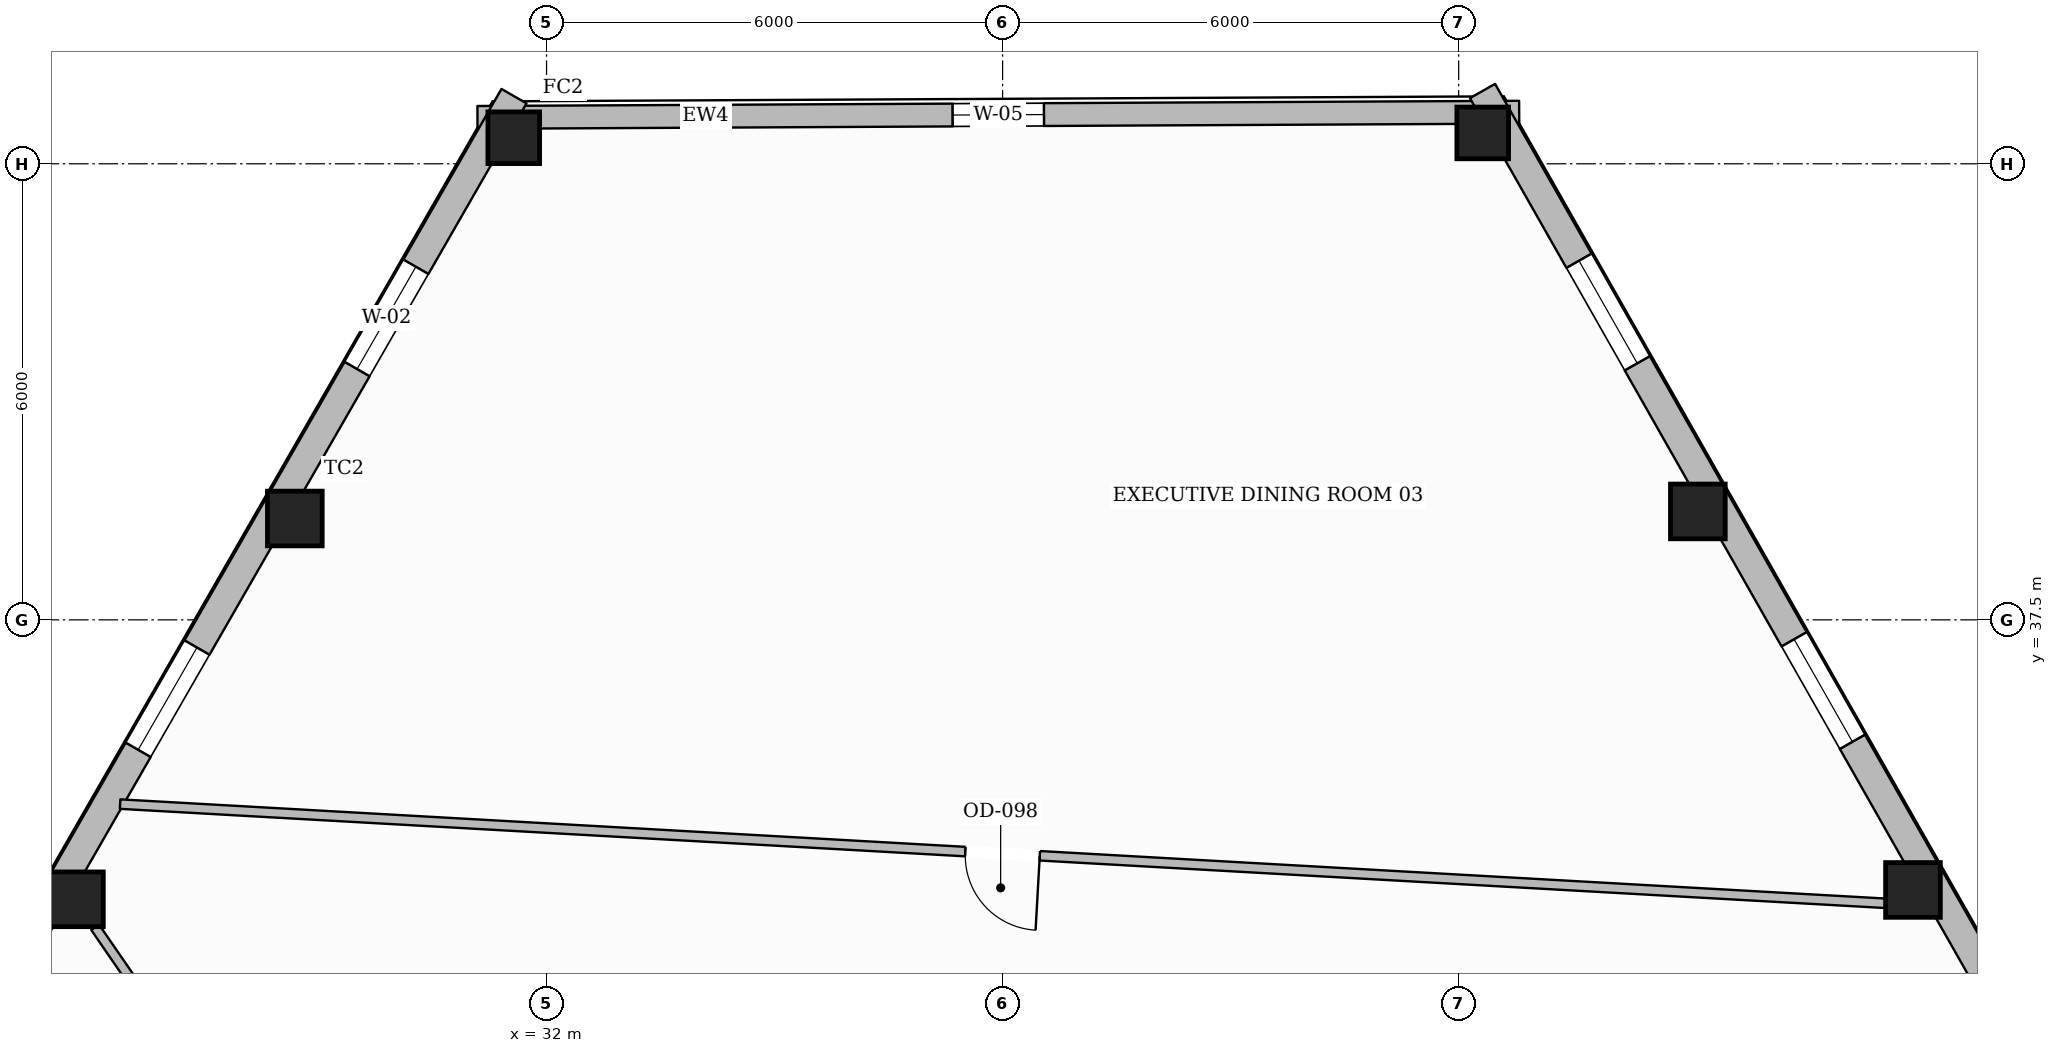
"""IFC4 building model, lengths in metres.
Left out: names, types, materials, properties, quantities, classifications, styles, units other than length and angle.
Written with IfcOpenShell. Run it as: python <this file> out.ifc"""

import sys

from ifc_helpers import new_model, si_unit, direction, frame, frame_2d, origin, origin_2d, place, context, subcontext, project, spatial, rectangle, hollow_rectangle, extrude, element, fill, save


model = new_model("IFC4")
c1 = context("Model", 3, precision=1e-05, world=origin(), true_north=direction((0.0, 1.0)))
c2 = subcontext(c1, "Body", "Model", "MODEL_VIEW")
j1 = project(units=[si_unit("LENGTHUNIT", "METRE"), si_unit("PLANEANGLEUNIT", "RADIAN")], contexts=[c1])
p1 = place(None, origin())
s1 = spatial("IfcSite", under=j1, at=p1, CompositionType="ELEMENT")
p2 = place(p1, origin())
s2 = spatial("IfcBuilding", under=s1, at=p2, CompositionType="ELEMENT")
p3 = place(p2, frame((0.0, 0.0, 85.5)))
s3 = spatial("IfcBuildingStorey", under=s2, at=p3, CompositionType="ELEMENT", Elevation=85.5)
p4 = place(p3, frame((31.569, 43.843, 0.0), z_axis=(0.0, 0.0, 1.0), x_axis=(1.0, 0.0, 0.0)))
e1 = element("IfcColumn", 1, at=p4, inside=s3, PredefinedType="COLUMN", context=c2, shape_type="SweptSolid", body=[
    extrude(hollow_rectangle(XDim=0.68, YDim=0.68, WallThickness=0.03, at=origin_2d()), origin(), (0.0, 0.0, 1.0), 3.6),
])
for number, where, z_axis, x_axis in (
    (2, (28.688, 38.833, 0.0), (0.0, 0.0, 1.0), (1.0, 0.0, 0.0)),
    (3, (25.808, 33.823, 0.0), (0.0, 0.0, 1.0), (1.0, 0.0, 0.0)),
    (4, (49.977, 33.946, 0.0), (0.0, 0.0, 1.0), (1.0, 0.0, 0.0)),
    (5, (47.147, 38.926, 0.0), (0.0, 0.0, 1.0), (1.0, 0.0, 0.0)),
):
    element("IfcColumn", number, at=place(p3, frame(where, z_axis=z_axis, x_axis=x_axis)), inside=s3, PredefinedType="COLUMN", context=c2, shape_type="SweptSolid", body=[
        extrude(hollow_rectangle(XDim=0.72, YDim=0.72, WallThickness=0.032, at=origin_2d()), origin(), (0.0, 0.0, 1.0), 3.6),
    ])
p5 = place(p3, frame((44.317, 43.906, 0.0), z_axis=(0.0, 0.0, 1.0), x_axis=(1.0, 0.0, 0.0)))
e6 = element("IfcColumn", 6, at=p5, inside=s3, PredefinedType="COLUMN", context=c2, shape_type="SweptSolid", body=[
    extrude(hollow_rectangle(XDim=0.68, YDim=0.68, WallThickness=0.03, at=origin_2d()), origin(), (0.0, 0.0, 1.0), 3.6),
])
p6 = place(p3, frame((31.091, 44.11, 0.0), z_axis=(0.0, 0.0, 1.0), x_axis=(0.999987649418, 0.004970011297, 0.0)))
e7 = element("IfcWall", 7, at=p6, inside=s3, PredefinedType="STANDARD", context=c2, shape_type="SweptSolid", body=[
    extrude(rectangle(XDim=13.705, YDim=0.3, at=frame_2d((6.853, 0.0))), origin(), (0.0, 0.0, 1.0), 3.059),
])
p7 = place(p6, frame((6.253, 0.0, 0.65)))
e8 = element("IfcOpeningElement", 8, at=p7, cuts=e7, PredefinedType="OPENING", context=c2, shape_type="SweptSolid", body=[
    extrude(rectangle(XDim=1.2, YDim=1.7, at=frame_2d((0.6, 0.85))), frame((0.0, 0.16, 0.0), z_axis=(0.0, -1.0, 0.0), x_axis=(1.0, 0.0, 0.0)), (0.0, 0.0, 1.0), 0.32),
])
p8 = place(p3, frame((13.817, 13.509, 0.0), z_axis=(0.0, 0.0, 1.0), x_axis=(0.498436356308, 0.866926293701, 0.0)))
e9 = element("IfcWall", 9, at=p8, inside=s3, PredefinedType="STANDARD", context=c2, shape_type="SweptSolid", body=[
    extrude(rectangle(XDim=35.622, YDim=0.38, at=frame_2d((17.811, 0.0))), origin(), (0.0, 0.0, 1.0), 3.059),
])
p9 = place(p8, frame((31.481, 0.0, 0.65)))
e10 = element("IfcOpeningElement", 10, at=p9, cuts=e9, PredefinedType="OPENING", context=c2, shape_type="SweptSolid", body=[
    extrude(rectangle(XDim=1.55, YDim=1.75, at=frame_2d((0.775, 0.875))), frame((0.0, 0.2, 0.0), z_axis=(0.0, -1.0, 0.0), x_axis=(1.0, 0.0, 0.0)), (0.0, 0.0, 1.0), 0.4),
])
p10 = place(p8, frame((25.703, 0.0, 0.65)))
e11 = element("IfcOpeningElement", 11, at=p10, cuts=e9, PredefinedType="OPENING", context=c2, shape_type="SweptSolid", body=[
    extrude(rectangle(XDim=1.55, YDim=1.75, at=frame_2d((0.775, 0.875))), frame((0.0, 0.2, 0.0), z_axis=(0.0, -1.0, 0.0), x_axis=(1.0, 0.0, 0.0)), (0.0, 0.0, 1.0), 0.4),
])
p11 = place(p8, frame((14.146, 0.0, 0.65)))
e12 = element("IfcOpeningElement", 12, at=p11, cuts=e9, PredefinedType="OPENING", context=c2, shape_type="SweptSolid", body=[
    extrude(rectangle(XDim=1.55, YDim=1.75, at=frame_2d((0.775, 0.875))), frame((0.0, 0.2, 0.0), z_axis=(0.0, -1.0, 0.0), x_axis=(1.0, 0.0, 0.0)), (0.0, 0.0, 1.0), 0.4),
])
p12 = place(p8, frame((8.367, 0.0, 0.65)))
e13 = element("IfcOpeningElement", 13, at=p12, cuts=e9, PredefinedType="OPENING", context=c2, shape_type="SweptSolid", body=[
    extrude(rectangle(XDim=1.55, YDim=1.75, at=frame_2d((0.775, 0.875))), frame((0.0, 0.2, 0.0), z_axis=(0.0, -1.0, 0.0), x_axis=(1.0, 0.0, 0.0)), (0.0, 0.0, 1.0), 0.4),
])
p13 = place(p8, frame((2.589, 0.0, 0.65)))
e14 = element("IfcOpeningElement", 14, at=p13, cuts=e9, PredefinedType="OPENING", context=c2, shape_type="SweptSolid", body=[
    extrude(rectangle(XDim=1.55, YDim=1.75, at=frame_2d((0.775, 0.875))), frame((0.0, 0.2, 0.0), z_axis=(0.0, -1.0, 0.0), x_axis=(1.0, 0.0, 0.0)), (0.0, 0.0, 1.0), 0.4),
])
p14 = place(p3, frame((44.314, 44.458, 0.0), z_axis=(0.0, 0.0, 1.0), x_axis=(0.494118179016, -0.869394746456, 0.0)))
e15 = element("IfcWall", 15, at=p14, inside=s3, PredefinedType="STANDARD", context=c2, shape_type="SweptSolid", body=[
    extrude(rectangle(XDim=35.322, YDim=0.38, at=frame_2d((17.661, 0.0))), origin(), (0.0, 0.0, 1.0), 3.059),
])
p15 = place(p14, frame((31.209, 0.0, 0.65)))
e16 = element("IfcOpeningElement", 16, at=p15, cuts=e15, PredefinedType="OPENING", context=c2, shape_type="SweptSolid", body=[
    extrude(rectangle(XDim=1.55, YDim=1.75, at=frame_2d((0.775, 0.875))), frame((0.0, 0.2, 0.0), z_axis=(0.0, -1.0, 0.0), x_axis=(1.0, 0.0, 0.0)), (0.0, 0.0, 1.0), 0.4),
])
p16 = place(p14, frame((25.481, 0.0, 0.65)))
e17 = element("IfcOpeningElement", 17, at=p16, cuts=e15, PredefinedType="OPENING", context=c2, shape_type="SweptSolid", body=[
    extrude(rectangle(XDim=1.55, YDim=1.75, at=frame_2d((0.775, 0.875))), frame((0.0, 0.2, 0.0), z_axis=(0.0, -1.0, 0.0), x_axis=(1.0, 0.0, 0.0)), (0.0, 0.0, 1.0), 0.4),
])
p17 = place(p14, frame((14.025, 0.0, 0.65)))
e18 = element("IfcOpeningElement", 18, at=p17, cuts=e15, PredefinedType="OPENING", context=c2, shape_type="SweptSolid", body=[
    extrude(rectangle(XDim=1.55, YDim=1.75, at=frame_2d((0.775, 0.875))), frame((0.0, 0.2, 0.0), z_axis=(0.0, -1.0, 0.0), x_axis=(1.0, 0.0, 0.0)), (0.0, 0.0, 1.0), 0.4),
])
p18 = place(p14, frame((8.298, 0.0, 0.65)))
e19 = element("IfcOpeningElement", 19, at=p18, cuts=e15, PredefinedType="OPENING", context=c2, shape_type="SweptSolid", body=[
    extrude(rectangle(XDim=1.55, YDim=1.75, at=frame_2d((0.775, 0.875))), frame((0.0, 0.2, 0.0), z_axis=(0.0, -1.0, 0.0), x_axis=(1.0, 0.0, 0.0)), (0.0, 0.0, 1.0), 0.4),
])
p19 = place(p14, frame((2.57, 0.0, 0.65)))
e20 = element("IfcOpeningElement", 20, at=p19, cuts=e15, PredefinedType="OPENING", context=c2, shape_type="SweptSolid", body=[
    extrude(rectangle(XDim=1.55, YDim=1.75, at=frame_2d((0.775, 0.875))), frame((0.0, 0.2, 0.0), z_axis=(0.0, -1.0, 0.0), x_axis=(1.0, 0.0, 0.0)), (0.0, 0.0, 1.0), 0.4),
])
p20 = place(p3, frame((31.788, 25.131, 0.0), z_axis=(0.0, 0.0, 1.0), x_axis=(-0.566752351953, 0.823888203312, 0.0)))
e21 = element("IfcWall", 21, at=p20, inside=s3, PredefinedType="PARTITIONING", context=c2, shape_type="SweptSolid", body=[
    extrude(rectangle(XDim=10.104, YDim=0.125, at=frame_2d((5.052, 0.0))), origin(), (0.0, 0.0, 1.0), 3.6),
])
p21 = place(p3, frame((49.609, 33.771, 0.0), z_axis=(0.0, 0.0, 1.0), x_axis=(-0.998425040952, 0.056102028483, 0.0)))
e22 = element("IfcWall", 22, at=p21, inside=s3, PredefinedType="PARTITIONING", context=c2, shape_type="SweptSolid", body=[
    extrude(rectangle(XDim=23.256, YDim=0.125, at=frame_2d((11.628, 0.0))), origin(), (0.0, 0.0, 1.0), 3.6),
])
p22 = place(p21, frame((11.138, 0.0, 0.0)))
e23 = element("IfcOpeningElement", 23, at=p22, cuts=e22, PredefinedType="OPENING", context=c2, shape_type="SweptSolid", body=[
    extrude(rectangle(XDim=0.98, YDim=2.15, at=frame_2d((0.49, 1.075))), frame((0.0, 0.073, 0.0), z_axis=(0.0, -1.0, 0.0), x_axis=(1.0, 0.0, 0.0)), (0.0, 0.0, 1.0), 0.145),
])
p23 = place(p9, origin())
e24 = element("IfcWindow", 24, at=p23, inside=s3, PartitioningType="SINGLE_PANEL", PredefinedType="WINDOW", context=c2, shape_type="SweptSolid", body=[
    extrude(rectangle(XDim=1.55, YDim=1.75, at=frame_2d((0.775, 0.875))), frame((0.0, 0.03, 0.0), z_axis=(0.0, -1.0, 0.0), x_axis=(1.0, 0.0, 0.0)), (0.0, 0.0, 1.0), 0.06),
])
fill(e10, e24)
p24 = place(p10, origin())
e25 = element("IfcWindow", 25, at=p24, inside=s3, PartitioningType="SINGLE_PANEL", PredefinedType="WINDOW", context=c2, shape_type="SweptSolid", body=[
    extrude(rectangle(XDim=1.55, YDim=1.75, at=frame_2d((0.775, 0.875))), frame((0.0, 0.03, 0.0), z_axis=(0.0, -1.0, 0.0), x_axis=(1.0, 0.0, 0.0)), (0.0, 0.0, 1.0), 0.06),
])
fill(e11, e25)
p25 = place(p18, origin())
e26 = element("IfcWindow", 26, at=p25, inside=s3, PartitioningType="SINGLE_PANEL", PredefinedType="WINDOW", context=c2, shape_type="SweptSolid", body=[
    extrude(rectangle(XDim=1.55, YDim=1.75, at=frame_2d((0.775, 0.875))), frame((0.0, 0.03, 0.0), z_axis=(0.0, -1.0, 0.0), x_axis=(1.0, 0.0, 0.0)), (0.0, 0.0, 1.0), 0.06),
])
fill(e19, e26)
p26 = place(p19, origin())
e27 = element("IfcWindow", 27, at=p26, inside=s3, PartitioningType="SINGLE_PANEL", PredefinedType="WINDOW", context=c2, shape_type="SweptSolid", body=[
    extrude(rectangle(XDim=1.55, YDim=1.75, at=frame_2d((0.775, 0.875))), frame((0.0, 0.03, 0.0), z_axis=(0.0, -1.0, 0.0), x_axis=(1.0, 0.0, 0.0)), (0.0, 0.0, 1.0), 0.06),
])
fill(e20, e27)
p27 = place(p7, origin())
e28 = element("IfcWindow", 28, at=p27, inside=s3, PartitioningType="SINGLE_PANEL", PredefinedType="WINDOW", context=c2, shape_type="SweptSolid", body=[
    extrude(rectangle(XDim=1.2, YDim=1.7, at=frame_2d((0.6, 0.85))), frame((0.0, 0.03, 0.0), z_axis=(0.0, -1.0, 0.0), x_axis=(1.0, 0.0, 0.0)), (0.0, 0.0, 1.0), 0.06),
])
fill(e8, e28)
p28 = place(p22, origin())
e29 = element("IfcDoor", 29, at=p28, inside=s3, OperationType="SINGLE_SWING_LEFT", PredefinedType="DOOR", context=c2, shape_type="SweptSolid", body=[
    extrude(rectangle(XDim=0.98, YDim=2.15, at=frame_2d((0.49, 1.075))), frame((0.0, 0.025, 0.0), z_axis=(0.0, -1.0, 0.0), x_axis=(1.0, 0.0, 0.0)), (0.0, 0.0, 1.0), 0.05),
])
fill(e23, e29)
save(model, sys.argv[1])
